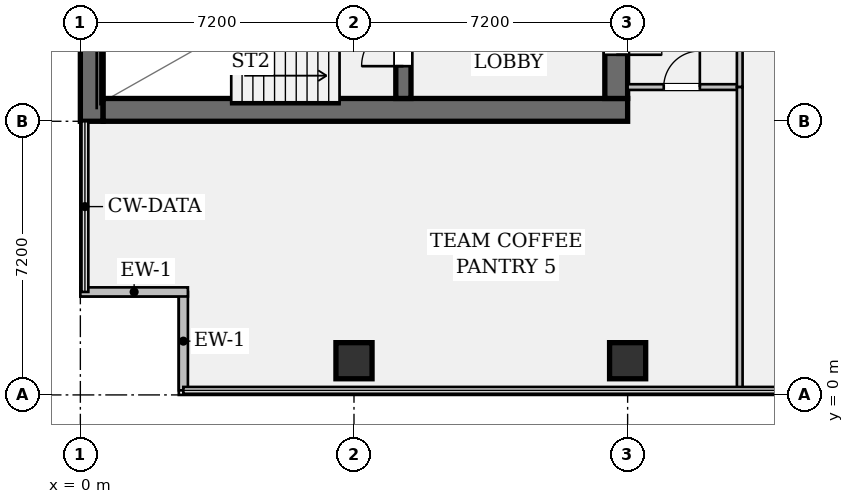
"""IFC4 building model, lengths in metres.
Left out: names, types, materials, properties, quantities, classifications, styles, units other than length and angle.
Written with IfcOpenShell. Run it as: python <this file> out.ifc"""

import sys

from ifc_helpers import new_model, si_unit, direction, frame, frame_2d, origin, origin_2d, place, context, subcontext, project, spatial, rectangle, hollow_rectangle, extrude, element, fill, save


model = new_model("IFC4")
c1 = context("Model", 3, precision=1e-05, world=origin(), true_north=direction((0.0, 1.0)))
c2 = subcontext(c1, "Body", "Model", "MODEL_VIEW")
j1 = project(units=[si_unit("LENGTHUNIT", "METRE"), si_unit("PLANEANGLEUNIT", "RADIAN")], contexts=[c1])
p1 = place(None, origin())
s1 = spatial("IfcSite", under=j1, at=p1, CompositionType="ELEMENT")
p2 = place(p1, origin())
s2 = spatial("IfcBuilding", under=s1, at=p2, CompositionType="ELEMENT")
p3 = place(p2, frame((0.0, 0.0, 85.05)))
s3 = spatial("IfcBuildingStorey", under=s2, at=p3, CompositionType="ELEMENT", Elevation=85.05)
p4 = place(p3, frame((0.3, 7.2, 0.0), z_axis=(0.0, 0.0, 1.0), x_axis=(0.0, 1.0, 0.0)))
e1 = element("IfcWall", 1, at=p4, inside=s3, PredefinedType="SHEAR", context=c2, shape_type="SweptSolid", body=[
    extrude(rectangle(XDim=28.8, YDim=0.6, at=frame_2d((14.4, 0.0))), origin(), (0.0, 0.0, 1.0), 3.57),
])
p5 = place(p3, frame((0.6, 7.5, 0.0), z_axis=(0.0, 0.0, 1.0), x_axis=(1.0, 0.0, 0.0)))
e2 = element("IfcWall", 2, at=p5, inside=s3, PredefinedType="SHEAR", context=c2, shape_type="SweptSolid", body=[
    extrude(rectangle(XDim=13.8, YDim=0.6, at=frame_2d((6.9, 0.0))), origin(), (0.0, 0.0, 1.0), 3.57),
])
p6 = place(p3, frame((14.1, 35.4, 0.0), z_axis=(0.0, 0.0, 1.0), x_axis=(0.0, -1.0, 0.0)))
e3 = element("IfcWall", 3, at=p6, inside=s3, PredefinedType="SHEAR", context=c2, shape_type="SweptSolid", body=[
    extrude(rectangle(XDim=27.6, YDim=0.6, at=frame_2d((13.8, 0.0))), origin(), (0.0, 0.0, 1.0), 3.57),
])
p7 = place(p6, frame((1.3, 0.0, 0.0)))
e4 = element("IfcOpeningElement", 4, at=p7, cuts=e3, PredefinedType="OPENING", context=c2, shape_type="SweptSolid", body=[
    extrude(rectangle(XDim=1.2, YDim=2.15, at=frame_2d((0.6, 1.075))), frame((0.0, 0.312, 0.0), z_axis=(0.0, -1.0, 0.0), x_axis=(1.0, 0.0, 0.0)), (0.0, 0.0, 1.0), 0.624),
])
p8 = place(p6, frame((25.25, 0.0, 0.0)))
e5 = element("IfcOpeningElement", 5, at=p8, cuts=e3, PredefinedType="OPENING", context=c2, shape_type="SweptSolid", body=[
    extrude(rectangle(XDim=1.2, YDim=2.15, at=frame_2d((0.6, 1.075))), frame((0.0, 0.312, 0.0), z_axis=(0.0, -1.0, 0.0), x_axis=(1.0, 0.0, 0.0)), (0.0, 0.0, 1.0), 0.624),
])
p9 = place(p6, frame((14.6, 0.0, 0.0)))
e6 = element("IfcOpeningElement", 6, at=p9, cuts=e3, PredefinedType="OPENING", context=c2, shape_type="SweptSolid", body=[
    extrude(rectangle(XDim=1.6, YDim=2.2, at=frame_2d((0.8, 1.1))), frame((0.0, 0.312, 0.0), z_axis=(0.0, -1.0, 0.0), x_axis=(1.0, 0.0, 0.0)), (0.0, 0.0, 1.0), 0.624),
])
p10 = place(p3, frame((8.5, 7.8, 0.0), z_axis=(0.0, 0.0, 1.0), x_axis=(0.0, 1.0, 0.0)))
e7 = element("IfcWall", 7, at=p10, inside=s3, PredefinedType="SHEAR", context=c2, shape_type="SweptSolid", body=[
    extrude(rectangle(XDim=3.68, YDim=0.4, at=frame_2d((1.84, 0.0))), origin(), (0.0, 0.0, 1.0), 3.57),
])
p11 = place(p10, frame((0.85, 0.0, 0.0)))
e8 = element("IfcOpeningElement", 8, at=p11, cuts=e7, PredefinedType="OPENING", context=c2, shape_type="SweptSolid", body=[
    extrude(rectangle(XDim=1.1, YDim=2.15, at=frame_2d((0.55, 1.075))), frame((0.0, 0.212, 0.0), z_axis=(0.0, -1.0, 0.0), x_axis=(1.0, 0.0, 0.0)), (0.0, 0.0, 1.0), 0.424),
])
for number, where, z_axis, x_axis in (
    (9, (7.2, 0.9, 0.0), (0.0, 0.0, 1.0), (1.0, 0.0, 0.0)),
    (10, (14.4, 0.9, 0.0), (0.0, 0.0, 1.0), (1.0, 0.0, 0.0)),
):
    element("IfcColumn", number, at=place(p3, frame(where, z_axis=z_axis, x_axis=x_axis)), inside=s3, PredefinedType="COLUMN", context=c2, shape_type="SweptSolid", body=[
        extrude(hollow_rectangle(XDim=0.95, YDim=0.95, WallThickness=0.06, at=origin_2d()), origin(), (0.0, 0.0, 1.0), 3.57),
    ])
p12 = place(p3, frame((2.71, 0.12, 0.0), z_axis=(0.0, 0.0, 1.0), x_axis=(0.0, 1.0, 0.0)))
e11 = element("IfcWall", 11, at=p12, inside=s3, PredefinedType="STANDARD", context=c2, shape_type="SweptSolid", body=[
    extrude(rectangle(XDim=2.59, YDim=0.24, at=frame_2d((1.295, 0.0))), origin(), (0.0, 0.0, 1.0), 3.57),
])
p13 = place(p3, frame((2.83, 2.71, 0.0), z_axis=(0.0, 0.0, 1.0), x_axis=(-1.0, 0.0, 0.0)))
e12 = element("IfcWall", 12, at=p13, inside=s3, PredefinedType="STANDARD", context=c2, shape_type="SweptSolid", body=[
    extrude(rectangle(XDim=2.83, YDim=0.24, at=frame_2d((1.415, 0.0))), origin(), (0.0, 0.0, 1.0), 3.57),
])
p14 = place(p3, frame((14.4, 8.1, 0.0), z_axis=(0.0, 0.0, 1.0), x_axis=(1.0, 0.0, 0.0)))
e13 = element("IfcWall", 13, at=p14, inside=s3, PredefinedType="PARTITIONING", context=c2, shape_type="SweptSolid", body=[
    extrude(rectangle(XDim=2.95, YDim=0.15, at=frame_2d((1.475, 0.0))), origin(), (0.0, 0.0, 1.0), 3.088),
])
p15 = place(p14, frame((0.95, 0.0, 0.0)))
e14 = element("IfcOpeningElement", 14, at=p15, cuts=e13, PredefinedType="OPENING", context=c2, shape_type="SweptSolid", body=[
    extrude(rectangle(XDim=0.95, YDim=2.15, at=frame_2d((0.475, 1.075))), frame((0.0, 0.087, 0.0), z_axis=(0.0, -1.0, 0.0), x_axis=(1.0, 0.0, 0.0)), (0.0, 0.0, 1.0), 0.174),
])
p16 = place(p3, frame((17.35, 8.1, 0.0), z_axis=(0.0, 0.0, 1.0), x_axis=(0.0, 1.0, 0.0)))
e15 = element("IfcWall", 15, at=p16, inside=s3, PredefinedType="PARTITIONING", context=c2, shape_type="SweptSolid", body=[
    extrude(rectangle(XDim=2.0, YDim=0.15, at=frame_2d((1.0, 0.0))), origin(), (0.0, 0.0, 1.0), 3.57),
])
p17 = place(p3, frame((17.35, 0.12, 0.0), z_axis=(0.0, 0.0, 1.0), x_axis=(0.0, 1.0, 0.0)))
e16 = element("IfcWall", 16, at=p17, inside=s3, PredefinedType="PARTITIONING", context=c2, shape_type="SweptSolid", body=[
    extrude(rectangle(XDim=7.98, YDim=0.15, at=frame_2d((3.99, 0.0))), origin(), (0.0, 0.0, 1.0), 2.783),
])
p18 = place(p11, origin())
e17 = element("IfcDoor", 17, at=p18, inside=s3, OperationType="SINGLE_SWING_LEFT", PredefinedType="DOOR", context=c2, shape_type="SweptSolid", body=[
    extrude(rectangle(XDim=1.1, YDim=2.15, at=frame_2d((0.55, 1.075))), frame((0.0, 0.025, 0.0), z_axis=(0.0, -1.0, 0.0), x_axis=(1.0, 0.0, 0.0)), (0.0, 0.0, 1.0), 0.05),
])
fill(e8, e17)
p19 = place(p8, origin())
e18 = element("IfcDoor", 18, at=p19, inside=s3, OperationType="SINGLE_SWING_RIGHT", PredefinedType="DOOR", context=c2, shape_type="SweptSolid", body=[
    extrude(rectangle(XDim=1.2, YDim=2.15, at=frame_2d((0.6, 1.075))), frame((0.0, 0.025, 0.0), z_axis=(0.0, -1.0, 0.0), x_axis=(1.0, 0.0, 0.0)), (0.0, 0.0, 1.0), 0.05),
])
fill(e5, e18)
p20 = place(p15, origin())
e19 = element("IfcDoor", 19, at=p20, inside=s3, OperationType="SINGLE_SWING_RIGHT", PredefinedType="DOOR", context=c2, shape_type="SweptSolid", body=[
    extrude(rectangle(XDim=0.95, YDim=2.15, at=frame_2d((0.475, 1.075))), frame((0.0, 0.025, 0.0), z_axis=(0.0, -1.0, 0.0), x_axis=(1.0, 0.0, 0.0)), (0.0, 0.0, 1.0), 0.05),
])
fill(e14, e19)
save(model, sys.argv[1])
